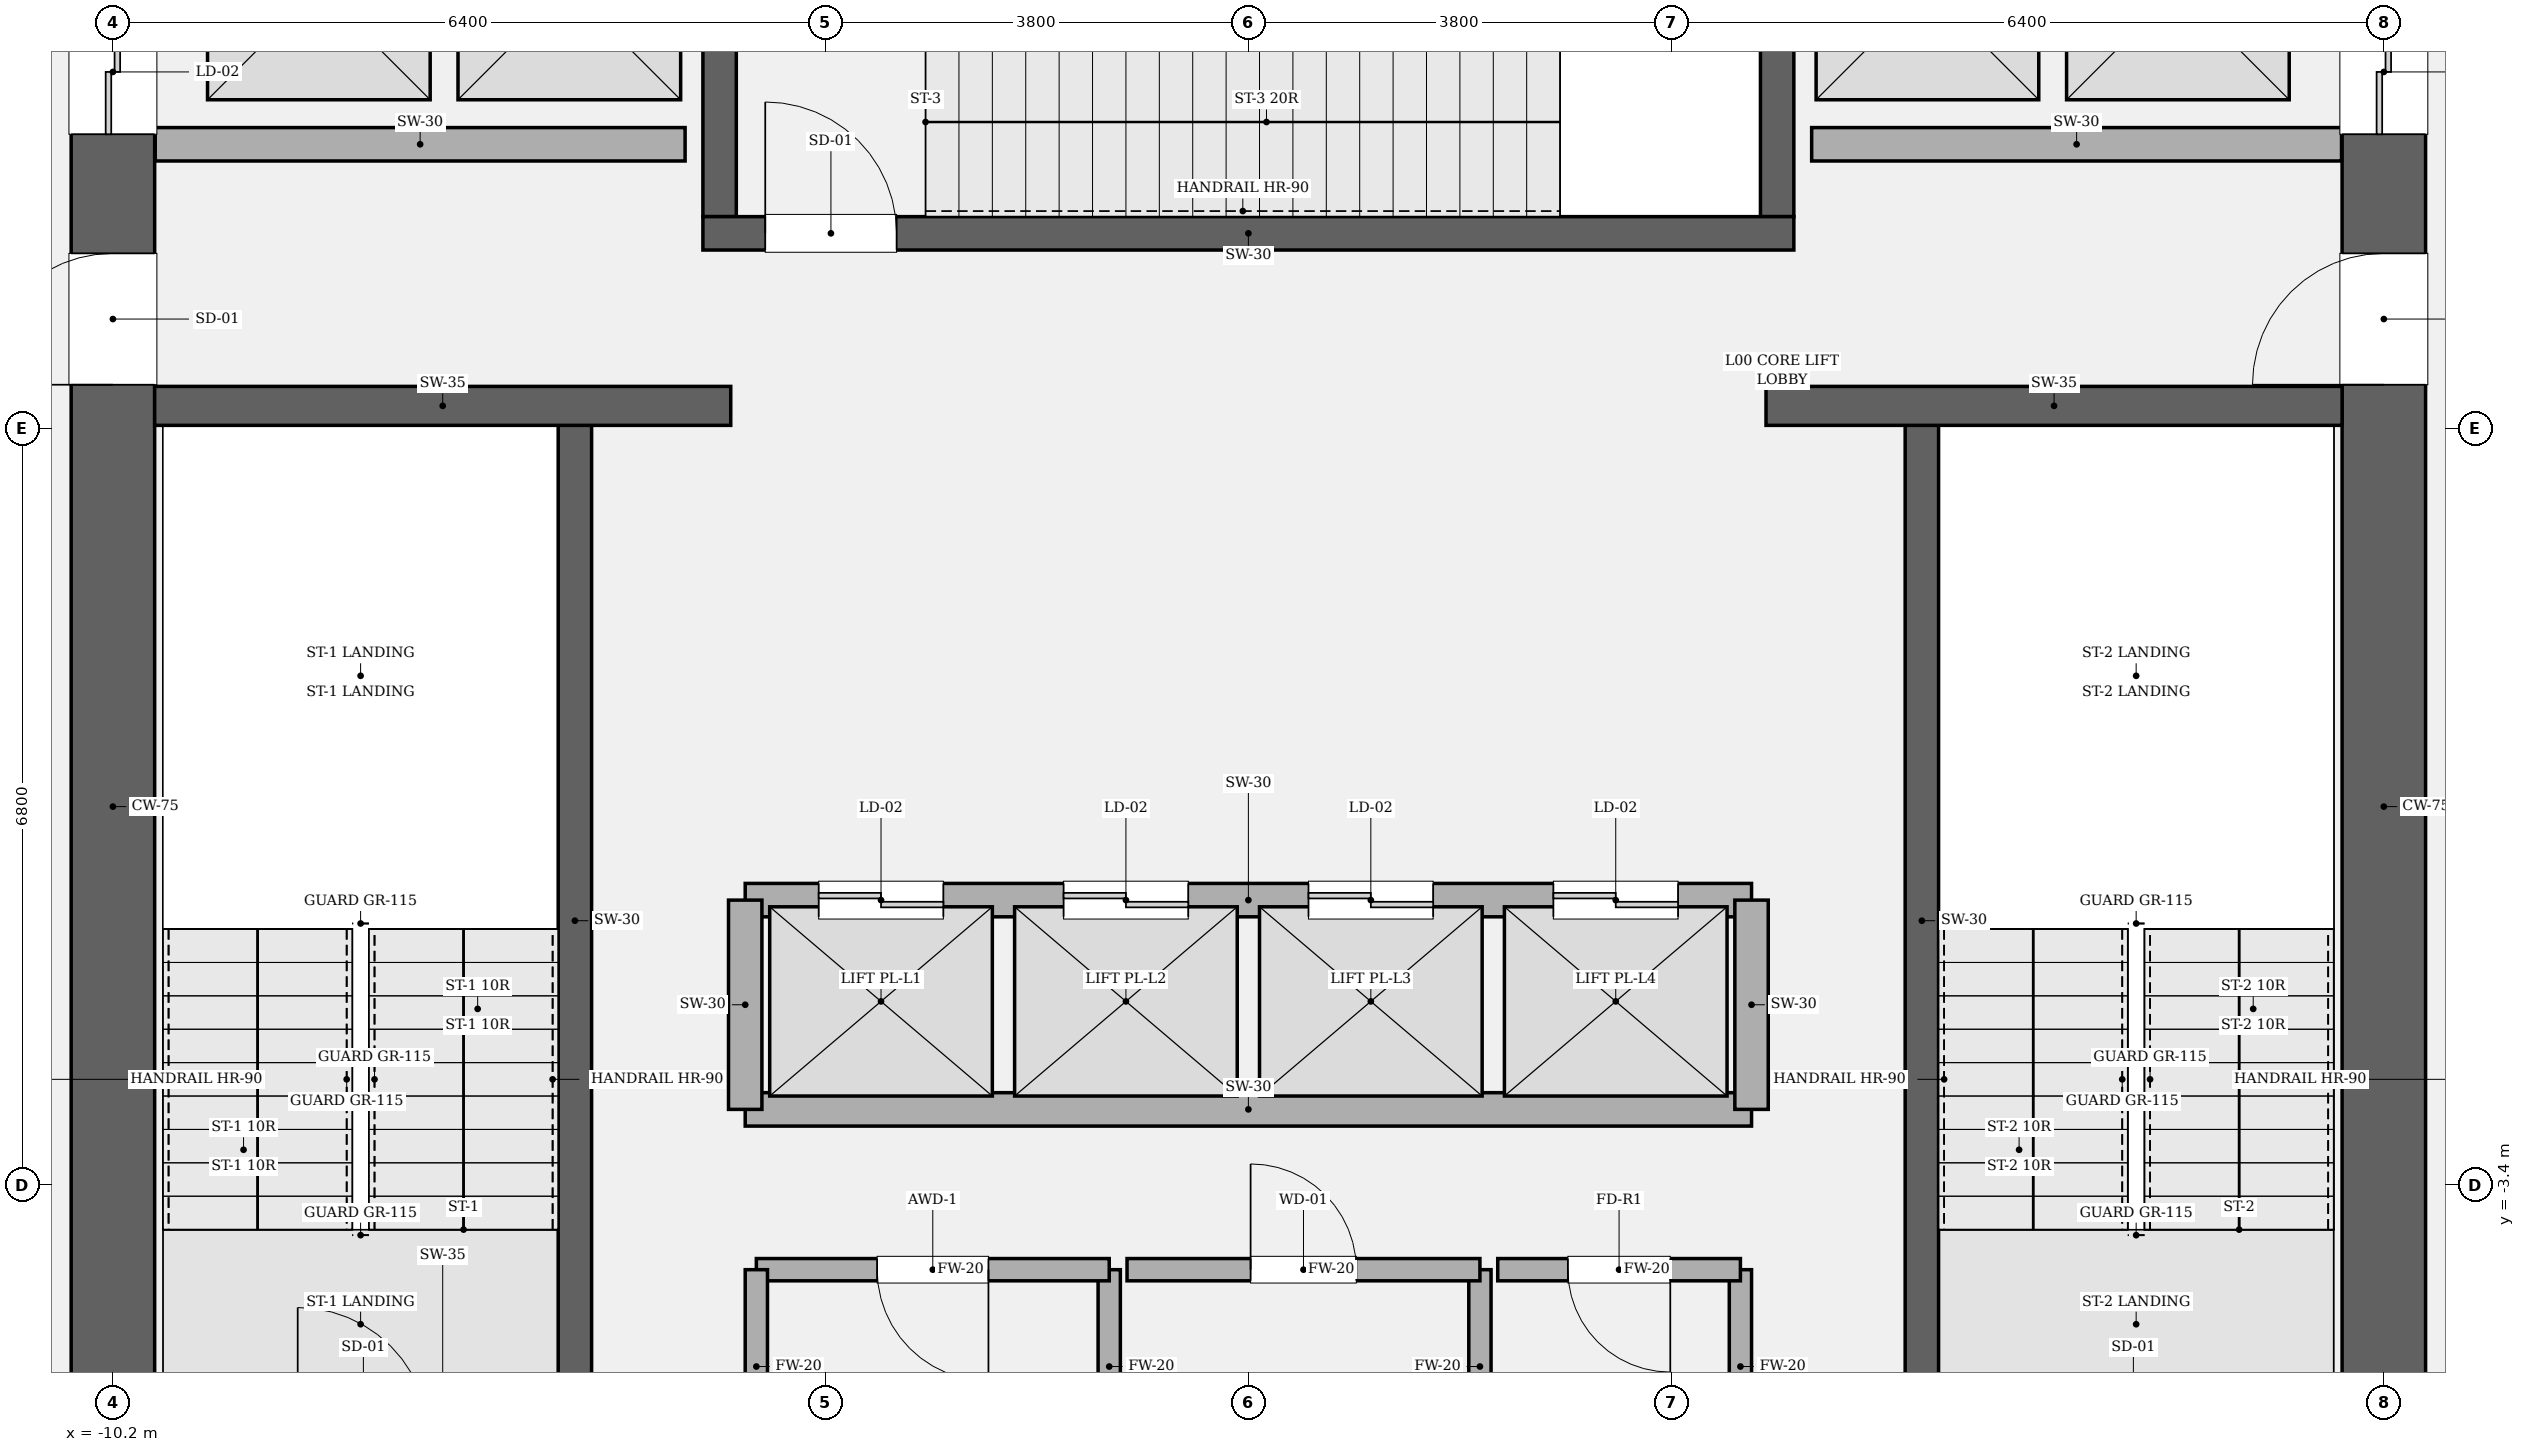
"""IFC4 building model, lengths in metres.
Left out: names, types, materials, properties, quantities, classifications, styles, units other than length and angle.
Written with IfcOpenShell. Run it as: python <this file> out.ifc"""

import sys

from ifc_helpers import new_model, si_unit, direction, frame, frame_2d, origin, place, context, subcontext, project, spatial, rectangle, extrude, element, fill, save


model = new_model("IFC4")
c1 = context("Model", 3, precision=1e-05, world=origin(), true_north=direction((0.0, 1.0)))
c2 = subcontext(c1, "Body", "Model", "MODEL_VIEW")
j1 = project(units=[si_unit("LENGTHUNIT", "METRE"), si_unit("PLANEANGLEUNIT", "RADIAN")], contexts=[c1])
p1 = place(None, origin())
s1 = spatial("IfcSite", under=j1, at=p1, CompositionType="ELEMENT")
p2 = place(p1, origin())
s2 = spatial("IfcBuilding", under=s1, at=p2, CompositionType="ELEMENT")
p3 = place(p2, origin())
s3 = spatial("IfcBuildingStorey", under=s2, at=p3, CompositionType="ELEMENT", Elevation=0.0)
p4 = place(p3, frame((-10.2, -8.825, 0.0), z_axis=(0.0, 0.0, 1.0), x_axis=(0.0, 1.0, 0.0)))
e1 = element("IfcWall", 1, at=p4, inside=s3, PredefinedType="SHEAR", context=c2, shape_type="SweptSolid", body=[
    extrude(rectangle(XDim=17.65, YDim=0.75, at=frame_2d((8.825, 0.0))), origin(), (0.0, 0.0, 1.0), 6.0),
])
p5 = place(p4, frame((12.615, 0.0, 0.0)))
e2 = element("IfcOpeningElement", 2, at=p5, cuts=e1, PredefinedType="OPENING", context=c2, shape_type="SweptSolid", body=[
    extrude(rectangle(XDim=1.18, YDim=2.2, at=frame_2d((0.59, 1.1))), frame((0.0, 0.385, 0.0), z_axis=(0.0, -1.0, 0.0), x_axis=(1.0, 0.0, 0.0)), (0.0, 0.0, 1.0), 0.77),
])
p6 = place(p4, frame((14.865, 0.0, 0.0)))
e3 = element("IfcOpeningElement", 3, at=p6, cuts=e1, PredefinedType="OPENING", context=c2, shape_type="SweptSolid", body=[
    extrude(rectangle(XDim=1.12, YDim=2.25, at=frame_2d((0.56, 1.125))), frame((0.0, 0.385, 0.0), z_axis=(0.0, -1.0, 0.0), x_axis=(1.0, 0.0, 0.0)), (0.0, 0.0, 1.0), 0.77),
])
p7 = place(p4, frame((16.245, 0.0, 0.0)))
e4 = element("IfcOpeningElement", 4, at=p7, cuts=e1, PredefinedType="OPENING", context=c2, shape_type="SweptSolid", body=[
    extrude(rectangle(XDim=1.12, YDim=2.25, at=frame_2d((0.56, 1.125))), frame((0.0, 0.385, 0.0), z_axis=(0.0, -1.0, 0.0), x_axis=(1.0, 0.0, 0.0)), (0.0, 0.0, 1.0), 0.77),
])
p8 = place(p3, frame((10.2, 8.825, 0.0), z_axis=(0.0, 0.0, 1.0), x_axis=(0.0, -1.0, 0.0)))
e5 = element("IfcWall", 5, at=p8, inside=s3, PredefinedType="SHEAR", context=c2, shape_type="SweptSolid", body=[
    extrude(rectangle(XDim=17.65, YDim=0.75, at=frame_2d((8.825, 0.0))), origin(), (0.0, 0.0, 1.0), 6.0),
])
p9 = place(p8, frame((3.855, 0.0, 0.0)))
e6 = element("IfcOpeningElement", 6, at=p9, cuts=e5, PredefinedType="OPENING", context=c2, shape_type="SweptSolid", body=[
    extrude(rectangle(XDim=1.18, YDim=2.2, at=frame_2d((0.59, 1.1))), frame((0.0, 0.385, 0.0), z_axis=(0.0, -1.0, 0.0), x_axis=(1.0, 0.0, 0.0)), (0.0, 0.0, 1.0), 0.77),
])
p10 = place(p8, frame((1.665, 0.0, 0.0)))
e7 = element("IfcOpeningElement", 7, at=p10, cuts=e5, PredefinedType="OPENING", context=c2, shape_type="SweptSolid", body=[
    extrude(rectangle(XDim=1.12, YDim=2.25, at=frame_2d((0.56, 1.125))), frame((0.0, 0.385, 0.0), z_axis=(0.0, -1.0, 0.0), x_axis=(1.0, 0.0, 0.0)), (0.0, 0.0, 1.0), 0.77),
])
p11 = place(p8, frame((0.285, 0.0, 0.0)))
e8 = element("IfcOpeningElement", 8, at=p11, cuts=e5, PredefinedType="OPENING", context=c2, shape_type="SweptSolid", body=[
    extrude(rectangle(XDim=1.12, YDim=2.25, at=frame_2d((0.56, 1.125))), frame((0.0, 0.385, 0.0), z_axis=(0.0, -1.0, 0.0), x_axis=(1.0, 0.0, 0.0)), (0.0, 0.0, 1.0), 0.77),
])
for number, where, z_axis, x_axis in (
    (9, (-6.05, -5.5, 0.0), (0.0, 0.0, 1.0), (0.0, 1.0, 0.0)),
    (10, (6.05, 3.45, 0.0), (0.0, 0.0, 1.0), (0.0, -1.0, 0.0)),
):
    element("IfcWall", number, at=place(p3, frame(where, z_axis=z_axis, x_axis=x_axis)), inside=s3, PredefinedType="SOLIDWALL", context=c2, shape_type="SweptSolid", body=[
        extrude(rectangle(XDim=8.95, YDim=0.3, at=frame_2d((4.475, 0.0))), origin(), (0.0, 0.0, 1.0), 6.0),
    ])
for number, where, z_axis, x_axis in (
    (11, (-4.75, 5.3, 0.0), (0.0, 0.0, 1.0), (0.0, 1.0, 0.0)),
    (12, (4.75, 8.825, 0.0), (0.0, 0.0, 1.0), (0.0, -1.0, 0.0)),
):
    element("IfcWall", number, at=place(p3, frame(where, z_axis=z_axis, x_axis=x_axis)), inside=s3, PredefinedType="SOLIDWALL", context=c2, shape_type="SweptSolid", body=[
        extrude(rectangle(XDim=3.525, YDim=0.3, at=frame_2d((1.762, 0.0))), origin(), (0.0, 0.0, 1.0), 6.0),
    ])
p12 = place(p3, frame((-4.9, 5.15, 0.0), z_axis=(0.0, 0.0, 1.0), x_axis=(1.0, 0.0, 0.0)))
e13 = element("IfcWall", 13, at=p12, inside=s3, PredefinedType="SOLIDWALL", context=c2, shape_type="SweptSolid", body=[
    extrude(rectangle(XDim=9.8, YDim=0.3, at=frame_2d((4.9, 0.0))), origin(), (0.0, 0.0, 1.0), 6.0),
])
p13 = place(p12, frame((0.56, 0.0, 0.0)))
e14 = element("IfcOpeningElement", 14, at=p13, cuts=e13, PredefinedType="OPENING", context=c2, shape_type="SweptSolid", body=[
    extrude(rectangle(XDim=1.18, YDim=2.2, at=frame_2d((0.59, 1.1))), frame((0.0, 0.16, 0.0), z_axis=(0.0, -1.0, 0.0), x_axis=(1.0, 0.0, 0.0)), (0.0, 0.0, 1.0), 0.32),
])
for number, where, z_axis, x_axis in (
    (15, (-9.825, 3.6, 0.0), (0.0, 0.0, 1.0), (1.0, 0.0, 0.0)),
    (16, (4.65, 3.6, 0.0), (0.0, 0.0, 1.0), (1.0, 0.0, 0.0)),
):
    element("IfcWall", number, at=place(p3, frame(where, z_axis=z_axis, x_axis=x_axis)), inside=s3, PredefinedType="SOLIDWALL", context=c2, shape_type="SweptSolid", body=[
        extrude(rectangle(XDim=5.175, YDim=0.35, at=frame_2d((2.587, 0.0))), origin(), (0.0, 0.0, 1.0), 6.0),
    ])
p14 = place(p3, frame((-4.52, -0.84, 0.0), z_axis=(0.0, 0.0, 1.0), x_axis=(1.0, 0.0, 0.0)))
e17 = element("IfcWall", 17, at=p14, inside=s3, PredefinedType="SOLIDWALL", context=c2, shape_type="SweptSolid", body=[
    extrude(rectangle(XDim=9.04, YDim=0.3, at=frame_2d((4.52, 0.0))), origin(), (0.0, 0.0, 1.0), 5.72),
])
p15 = place(p14, frame((0.66, 0.0, 0.0)))
e18 = element("IfcOpeningElement", 18, at=p15, cuts=e17, PredefinedType="OPENING", context=c2, shape_type="SweptSolid", body=[
    extrude(rectangle(XDim=1.12, YDim=2.25, at=frame_2d((0.56, 1.125))), frame((0.0, 0.16, 0.0), z_axis=(0.0, -1.0, 0.0), x_axis=(1.0, 0.0, 0.0)), (0.0, 0.0, 1.0), 0.32),
])
p16 = place(p14, frame((2.86, 0.0, 0.0)))
e19 = element("IfcOpeningElement", 19, at=p16, cuts=e17, PredefinedType="OPENING", context=c2, shape_type="SweptSolid", body=[
    extrude(rectangle(XDim=1.12, YDim=2.25, at=frame_2d((0.56, 1.125))), frame((0.0, 0.16, 0.0), z_axis=(0.0, -1.0, 0.0), x_axis=(1.0, 0.0, 0.0)), (0.0, 0.0, 1.0), 0.32),
])
p17 = place(p14, frame((5.06, 0.0, 0.0)))
e20 = element("IfcOpeningElement", 20, at=p17, cuts=e17, PredefinedType="OPENING", context=c2, shape_type="SweptSolid", body=[
    extrude(rectangle(XDim=1.12, YDim=2.25, at=frame_2d((0.56, 1.125))), frame((0.0, 0.16, 0.0), z_axis=(0.0, -1.0, 0.0), x_axis=(1.0, 0.0, 0.0)), (0.0, 0.0, 1.0), 0.32),
])
p18 = place(p14, frame((7.26, 0.0, 0.0)))
e21 = element("IfcOpeningElement", 21, at=p18, cuts=e17, PredefinedType="OPENING", context=c2, shape_type="SweptSolid", body=[
    extrude(rectangle(XDim=1.12, YDim=2.25, at=frame_2d((0.56, 1.125))), frame((0.0, 0.16, 0.0), z_axis=(0.0, -1.0, 0.0), x_axis=(1.0, 0.0, 0.0)), (0.0, 0.0, 1.0), 0.32),
])
p19 = place(p3, frame((-4.52, -2.72, 0.0), z_axis=(0.0, 0.0, 1.0), x_axis=(1.0, 0.0, 0.0)))
e22 = element("IfcWall", 22, at=p19, inside=s3, PredefinedType="SOLIDWALL", context=c2, shape_type="SweptSolid", body=[
    extrude(rectangle(XDim=9.04, YDim=0.3, at=frame_2d((4.52, 0.0))), origin(), (0.0, 0.0, 1.0), 5.72),
])
for number, where, z_axis, x_axis in (
    (23, (-4.52, -2.72, 0.0), (0.0, 0.0, 1.0), (0.0, 1.0, 0.0)),
    (24, (4.52, -2.72, 0.0), (0.0, 0.0, 1.0), (0.0, 1.0, 0.0)),
):
    element("IfcWall", number, at=place(p3, frame(where, z_axis=z_axis, x_axis=x_axis)), inside=s3, PredefinedType="SOLIDWALL", context=c2, shape_type="SweptSolid", body=[
        extrude(rectangle(XDim=1.88, YDim=0.3, at=frame_2d((0.94, 0.0))), origin(), (0.0, 0.0, 1.0), 5.72),
    ])
for number, where, z_axis, x_axis in (
    (25, (-9.82, 5.95, 0.0), (0.0, 0.0, 1.0), (1.0, 0.0, 0.0)),
    (26, (5.06, 5.95, 0.0), (0.0, 0.0, 1.0), (1.0, 0.0, 0.0)),
):
    element("IfcWall", number, at=place(p3, frame(where, z_axis=z_axis, x_axis=x_axis)), inside=s3, PredefinedType="SOLIDWALL", context=c2, shape_type="SweptSolid", body=[
        extrude(rectangle(XDim=4.76, YDim=0.3, at=frame_2d((2.38, 0.0))), origin(), (0.0, 0.0, 1.0), 5.72),
    ])
p20 = place(p3, frame((-1.25, -5.9, 0.0), z_axis=(0.0, 0.0, 1.0), x_axis=(0.0, 1.0, 0.0)))
e27 = element("IfcWall", 27, at=p20, inside=s3, PredefinedType="SOLIDWALL", context=c2, shape_type="SweptSolid", body=[
    extrude(rectangle(XDim=1.74, YDim=0.2, at=frame_2d((0.87, 0.0))), origin(), (0.0, 0.0, 1.0), 5.72),
])
p21 = place(p3, frame((-1.25, -4.16, 0.0), z_axis=(0.0, 0.0, 1.0), x_axis=(-1.0, 0.0, 0.0)))
e28 = element("IfcWall", 28, at=p21, inside=s3, PredefinedType="SOLIDWALL", context=c2, shape_type="SweptSolid", body=[
    extrude(rectangle(XDim=3.17, YDim=0.2, at=frame_2d((1.585, 0.0))), origin(), (0.0, 0.0, 1.0), 5.72),
])
p22 = place(p21, frame((1.085, 0.0, 0.0)))
e29 = element("IfcOpeningElement", 29, at=p22, cuts=e28, PredefinedType="OPENING", context=c2, shape_type="SweptSolid", body=[
    extrude(rectangle(XDim=1.0, YDim=2.15, at=frame_2d((0.5, 1.075))), frame((0.0, 0.11, 0.0), z_axis=(0.0, -1.0, 0.0), x_axis=(1.0, 0.0, 0.0)), (0.0, 0.0, 1.0), 0.22),
])
for number, where, z_axis, x_axis in (
    (30, (-4.42, -4.16, 0.0), (0.0, 0.0, 1.0), (0.0, -1.0, 0.0)),
    (31, (2.08, -5.9, 0.0), (0.0, 0.0, 1.0), (0.0, 1.0, 0.0)),
):
    element("IfcWall", number, at=place(p3, frame(where, z_axis=z_axis, x_axis=x_axis)), inside=s3, PredefinedType="SOLIDWALL", context=c2, shape_type="SweptSolid", body=[
        extrude(rectangle(XDim=1.74, YDim=0.2, at=frame_2d((0.87, 0.0))), origin(), (0.0, 0.0, 1.0), 5.72),
    ])
p23 = place(p3, frame((2.08, -4.16, 0.0), z_axis=(0.0, 0.0, 1.0), x_axis=(-1.0, 0.0, 0.0)))
e32 = element("IfcWall", 32, at=p23, inside=s3, PredefinedType="SOLIDWALL", context=c2, shape_type="SweptSolid", body=[
    extrude(rectangle(XDim=3.17, YDim=0.2, at=frame_2d((1.585, 0.0))), origin(), (0.0, 0.0, 1.0), 5.72),
])
p24 = place(p23, frame((1.11, 0.0, 0.0)))
e33 = element("IfcOpeningElement", 33, at=p24, cuts=e32, PredefinedType="OPENING", context=c2, shape_type="SweptSolid", body=[
    extrude(rectangle(XDim=0.95, YDim=2.15, at=frame_2d((0.475, 1.075))), frame((0.0, 0.11, 0.0), z_axis=(0.0, -1.0, 0.0), x_axis=(1.0, 0.0, 0.0)), (0.0, 0.0, 1.0), 0.22),
])
p25 = place(p3, frame((4.42, -5.9, 0.0), z_axis=(0.0, 0.0, 1.0), x_axis=(0.0, 1.0, 0.0)))
e34 = element("IfcWall", 34, at=p25, inside=s3, PredefinedType="SOLIDWALL", context=c2, shape_type="SweptSolid", body=[
    extrude(rectangle(XDim=1.74, YDim=0.2, at=frame_2d((0.87, 0.0))), origin(), (0.0, 0.0, 1.0), 5.72),
])
p26 = place(p3, frame((4.42, -4.16, 0.0), z_axis=(0.0, 0.0, 1.0), x_axis=(-1.0, 0.0, 0.0)))
e35 = element("IfcWall", 35, at=p26, inside=s3, PredefinedType="SOLIDWALL", context=c2, shape_type="SweptSolid", body=[
    extrude(rectangle(XDim=2.18, YDim=0.2, at=frame_2d((1.09, 0.0))), origin(), (0.0, 0.0, 1.0), 5.72),
])
p27 = place(p26, frame((0.63, 0.0, 0.0)))
e36 = element("IfcOpeningElement", 36, at=p27, cuts=e35, PredefinedType="OPENING", context=c2, shape_type="SweptSolid", body=[
    extrude(rectangle(XDim=0.92, YDim=2.1, at=frame_2d((0.46, 1.05))), frame((0.0, 0.11, 0.0), z_axis=(0.0, -1.0, 0.0), x_axis=(1.0, 0.0, 0.0)), (0.0, 0.0, 1.0), 0.22),
])
p28 = place(p13, origin())
e37 = element("IfcDoor", 37, at=p28, inside=s3, OperationType="SINGLE_SWING_LEFT", PredefinedType="DOOR", context=c2, shape_type="SweptSolid", body=[
    extrude(rectangle(XDim=1.18, YDim=2.2, at=frame_2d((0.59, 1.1))), frame((0.0, 0.025, 0.0), z_axis=(0.0, -1.0, 0.0), x_axis=(1.0, 0.0, 0.0)), (0.0, 0.0, 1.0), 0.05),
])
fill(e14, e37)
p29 = place(p5, origin())
e38 = element("IfcDoor", 38, at=p29, inside=s3, OperationType="SINGLE_SWING_LEFT", PredefinedType="DOOR", context=c2, shape_type="SweptSolid", body=[
    extrude(rectangle(XDim=1.18, YDim=2.2, at=frame_2d((0.59, 1.1))), frame((0.0, 0.025, 0.0), z_axis=(0.0, -1.0, 0.0), x_axis=(1.0, 0.0, 0.0)), (0.0, 0.0, 1.0), 0.05),
])
fill(e2, e38)
p30 = place(p9, origin())
e39 = element("IfcDoor", 39, at=p30, inside=s3, OperationType="SINGLE_SWING_RIGHT", PredefinedType="DOOR", context=c2, shape_type="SweptSolid", body=[
    extrude(rectangle(XDim=1.18, YDim=2.2, at=frame_2d((0.59, 1.1))), frame((0.0, 0.025, 0.0), z_axis=(0.0, -1.0, 0.0), x_axis=(1.0, 0.0, 0.0)), (0.0, 0.0, 1.0), 0.05),
])
fill(e6, e39)
p31 = place(p15, origin())
e40 = element("IfcDoor", 40, at=p31, inside=s3, OperationType="DOUBLE_DOOR_SLIDING", PredefinedType="DOOR", context=c2, shape_type="SweptSolid", body=[
    extrude(rectangle(XDim=1.12, YDim=2.25, at=frame_2d((0.56, 1.125))), frame((0.0, 0.025, 0.0), z_axis=(0.0, -1.0, 0.0), x_axis=(1.0, 0.0, 0.0)), (0.0, 0.0, 1.0), 0.05),
])
fill(e18, e40)
p32 = place(p16, origin())
e41 = element("IfcDoor", 41, at=p32, inside=s3, OperationType="DOUBLE_DOOR_SLIDING", PredefinedType="DOOR", context=c2, shape_type="SweptSolid", body=[
    extrude(rectangle(XDim=1.12, YDim=2.25, at=frame_2d((0.56, 1.125))), frame((0.0, 0.025, 0.0), z_axis=(0.0, -1.0, 0.0), x_axis=(1.0, 0.0, 0.0)), (0.0, 0.0, 1.0), 0.05),
])
fill(e19, e41)
p33 = place(p17, origin())
e42 = element("IfcDoor", 42, at=p33, inside=s3, OperationType="DOUBLE_DOOR_SLIDING", PredefinedType="DOOR", context=c2, shape_type="SweptSolid", body=[
    extrude(rectangle(XDim=1.12, YDim=2.25, at=frame_2d((0.56, 1.125))), frame((0.0, 0.025, 0.0), z_axis=(0.0, -1.0, 0.0), x_axis=(1.0, 0.0, 0.0)), (0.0, 0.0, 1.0), 0.05),
])
fill(e20, e42)
p34 = place(p18, origin())
e43 = element("IfcDoor", 43, at=p34, inside=s3, OperationType="DOUBLE_DOOR_SLIDING", PredefinedType="DOOR", context=c2, shape_type="SweptSolid", body=[
    extrude(rectangle(XDim=1.12, YDim=2.25, at=frame_2d((0.56, 1.125))), frame((0.0, 0.025, 0.0), z_axis=(0.0, -1.0, 0.0), x_axis=(1.0, 0.0, 0.0)), (0.0, 0.0, 1.0), 0.05),
])
fill(e21, e43)
p35 = place(p6, origin())
e44 = element("IfcDoor", 44, at=p35, inside=s3, OperationType="DOUBLE_DOOR_SLIDING", PredefinedType="DOOR", context=c2, shape_type="SweptSolid", body=[
    extrude(rectangle(XDim=1.12, YDim=2.25, at=frame_2d((0.56, 1.125))), frame((0.0, 0.025, 0.0), z_axis=(0.0, -1.0, 0.0), x_axis=(1.0, 0.0, 0.0)), (0.0, 0.0, 1.0), 0.05),
])
fill(e3, e44)
p36 = place(p10, origin())
e45 = element("IfcDoor", 45, at=p36, inside=s3, OperationType="DOUBLE_DOOR_SLIDING", PredefinedType="DOOR", context=c2, shape_type="SweptSolid", body=[
    extrude(rectangle(XDim=1.12, YDim=2.25, at=frame_2d((0.56, 1.125))), frame((0.0, 0.025, 0.0), z_axis=(0.0, -1.0, 0.0), x_axis=(1.0, 0.0, 0.0)), (0.0, 0.0, 1.0), 0.05),
])
fill(e7, e45)
p37 = place(p22, origin())
e46 = element("IfcDoor", 46, at=p37, inside=s3, OperationType="SINGLE_SWING_LEFT", PredefinedType="DOOR", context=c2, shape_type="SweptSolid", body=[
    extrude(rectangle(XDim=1.0, YDim=2.15, at=frame_2d((0.5, 1.075))), frame((0.0, 0.025, 0.0), z_axis=(0.0, -1.0, 0.0), x_axis=(1.0, 0.0, 0.0)), (0.0, 0.0, 1.0), 0.05),
])
fill(e29, e46)
p38 = place(p24, origin())
e47 = element("IfcDoor", 47, at=p38, inside=s3, OperationType="SINGLE_SWING_RIGHT", PredefinedType="DOOR", context=c2, shape_type="SweptSolid", body=[
    extrude(rectangle(XDim=0.95, YDim=2.15, at=frame_2d((0.475, 1.075))), frame((0.0, 0.025, 0.0), z_axis=(0.0, -1.0, 0.0), x_axis=(1.0, 0.0, 0.0)), (0.0, 0.0, 1.0), 0.05),
])
fill(e33, e47)
p39 = place(p27, origin())
e48 = element("IfcDoor", 48, at=p39, inside=s3, OperationType="SINGLE_SWING_LEFT", PredefinedType="DOOR", context=c2, shape_type="SweptSolid", body=[
    extrude(rectangle(XDim=0.92, YDim=2.1, at=frame_2d((0.46, 1.05))), frame((0.0, 0.025, 0.0), z_axis=(0.0, -1.0, 0.0), x_axis=(1.0, 0.0, 0.0)), (0.0, 0.0, 1.0), 0.05),
])
fill(e36, e48)
save(model, sys.argv[1])
